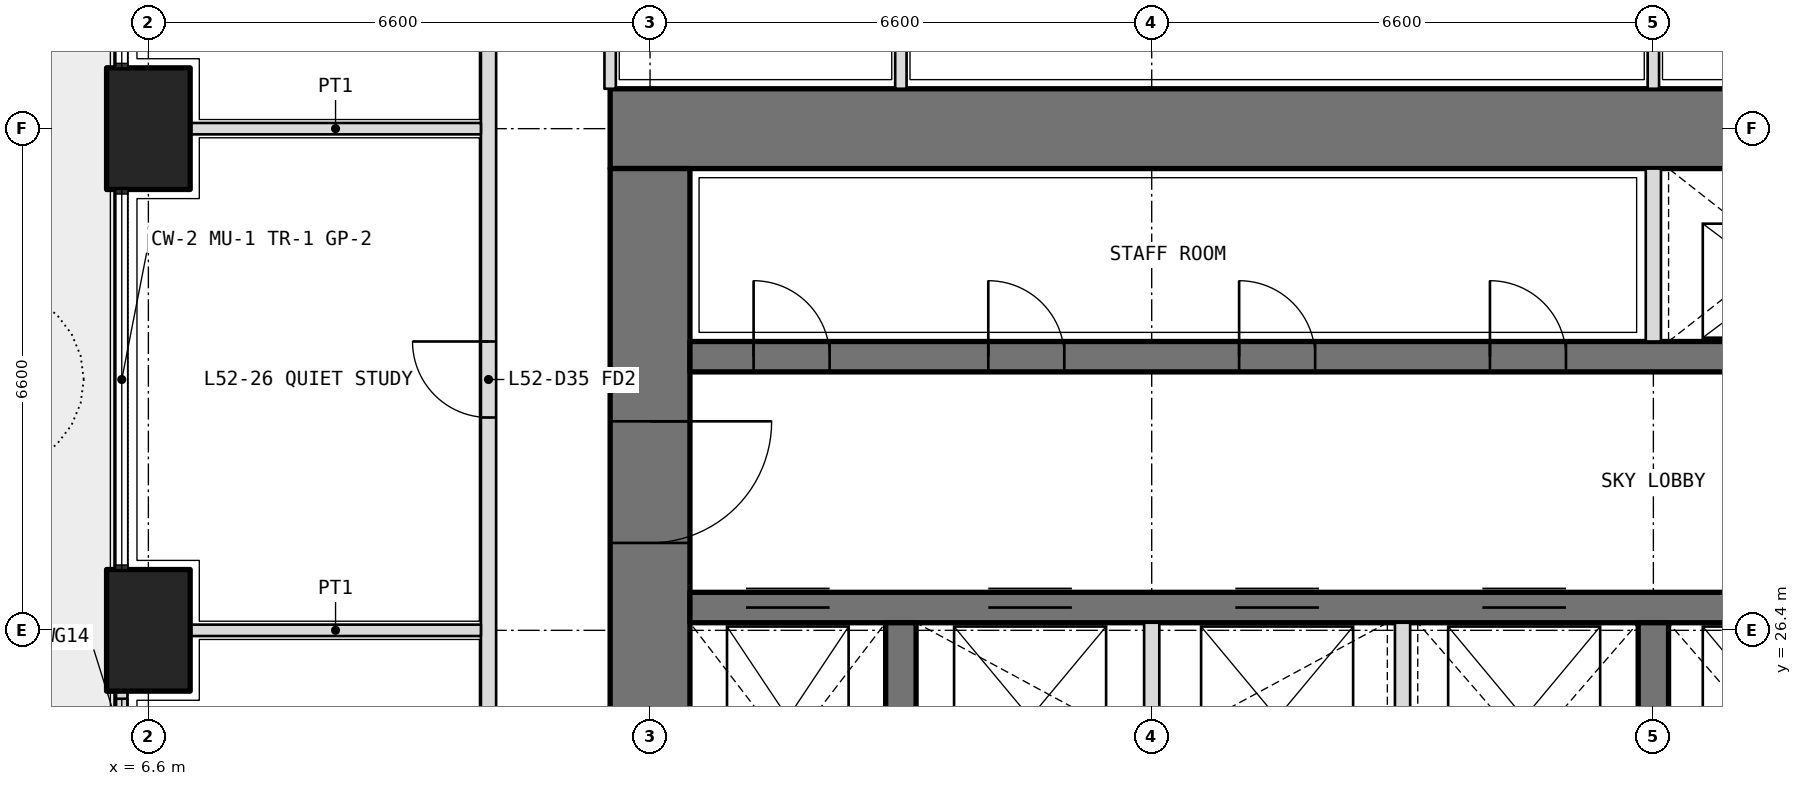
"""IFC4 building model, lengths in metres.
Left out: names, types, materials, properties, quantities, classifications, styles, units other than length and angle.
Written with IfcOpenShell. Run it as: python <this file> out.ifc"""

import sys

from ifc_helpers import new_model, si_unit, direction, frame, frame_2d, origin, origin_2d, place, context, subcontext, project, spatial, rectangle, extrude, element, fill, save


model = new_model("IFC4")
c1 = context("Model", 3, precision=1e-05, world=origin(), true_north=direction((0.0, 1.0)))
c2 = subcontext(c1, "Body", "Model", "MODEL_VIEW")
j1 = project(units=[si_unit("LENGTHUNIT", "METRE"), si_unit("PLANEANGLEUNIT", "RADIAN")], contexts=[c1])
p1 = place(None, origin())
s1 = spatial("IfcSite", under=j1, at=p1, CompositionType="ELEMENT")
p2 = place(p1, origin())
s2 = spatial("IfcBuilding", under=s1, at=p2, CompositionType="ELEMENT")
p3 = place(p2, frame((0.0, 0.0, 229.2)))
s3 = spatial("IfcBuildingStorey", under=s2, at=p3, CompositionType="ELEMENT", Elevation=229.2)
for number, where, z_axis, x_axis in (
    (1, (6.6, 26.4, 0.0), (0.0, 0.0, 1.0), (0.0, 1.0, 0.0)),
    (2, (6.6, 33.0, 0.0), (0.0, 0.0, 1.0), (0.0, 1.0, 0.0)),
):
    element("IfcColumn", number, at=place(p3, frame(where, z_axis=z_axis, x_axis=x_axis)), inside=s3, PredefinedType="COLUMN", context=c2, shape_type="SweptSolid", body=[
        extrude(rectangle(XDim=1.6, YDim=1.1, at=origin_2d()), origin(), (0.0, 0.0, 1.0), 4.2),
    ])
p4 = place(p3, frame((6.25, 25.6, 0.0), z_axis=(0.0, 0.0, 1.0), x_axis=(0.0, -1.0, 0.0)))
e3 = element("IfcWall", 3, at=p4, inside=s3, PredefinedType="SOLIDWALL", context=c2, shape_type="SweptSolid", body=[
    extrude(rectangle(XDim=5.0, YDim=0.15, at=frame_2d((2.5, 0.0))), origin(), (0.0, 0.0, 1.0), 2.7),
])
p5 = place(p4, frame((1.25, 0.0, 0.0)))
e4 = element("IfcOpeningElement", 4, at=p5, cuts=e3, PredefinedType="OPENING", context=c2, shape_type="SweptSolid", body=[
    extrude(rectangle(XDim=1.0, YDim=2.4, at=frame_2d((0.5, 1.2))), frame((0.0, 0.085, 0.0), z_axis=(0.0, -1.0, 0.0), x_axis=(1.0, 0.0, 0.0)), (0.0, 0.0, 1.0), 0.17),
])
p6 = place(p4, frame((0.1, 0.0, 0.1)))
e5 = element("IfcOpeningElement", 5, at=p6, cuts=e3, PredefinedType="OPENING", context=c2, shape_type="SweptSolid", body=[
    extrude(rectangle(XDim=1.05, YDim=2.3, at=frame_2d((0.525, 1.15))), frame((0.0, 0.085, 0.0), z_axis=(0.0, -1.0, 0.0), x_axis=(1.0, 0.0, 0.0)), (0.0, 0.0, 1.0), 0.17),
])
p7 = place(p4, frame((2.75, 0.0, 0.1)))
e6 = element("IfcOpeningElement", 6, at=p7, cuts=e3, PredefinedType="OPENING", context=c2, shape_type="SweptSolid", body=[
    extrude(rectangle(XDim=2.15, YDim=2.3, at=frame_2d((1.075, 1.15))), frame((0.0, 0.085, 0.0), z_axis=(0.0, -1.0, 0.0), x_axis=(1.0, 0.0, 0.0)), (0.0, 0.0, 1.0), 0.17),
])
p8 = place(p3, frame((40.125, 33.0, 0.0), z_axis=(0.0, 0.0, 1.0), x_axis=(-1.0, 0.0, 0.0)))
e7 = element("IfcWall", 7, at=p8, inside=s3, PredefinedType="SHEAR", context=c2, shape_type="SweptSolid", body=[
    extrude(rectangle(XDim=27.45, YDim=1.05, at=frame_2d((13.725, 0.0))), origin(), (0.0, 0.0, 1.0), 4.2),
])
p9 = place(p3, frame((13.2, 32.475, 0.0), z_axis=(0.0, 0.0, 1.0), x_axis=(0.0, -1.0, 0.0)))
e8 = element("IfcWall", 8, at=p9, inside=s3, PredefinedType="SHEAR", context=c2, shape_type="SweptSolid", body=[
    extrude(rectangle(XDim=18.75, YDim=1.05, at=frame_2d((9.375, 0.0))), origin(), (0.0, 0.0, 1.0), 4.2),
])
p10 = place(p9, frame((14.125, 0.0, 0.0)))
e9 = element("IfcOpeningElement", 9, at=p10, cuts=e8, PredefinedType="OPENING", context=c2, shape_type="SweptSolid", body=[
    extrude(rectangle(XDim=1.6, YDim=2.1, at=frame_2d((0.8, 1.05))), frame((0.0, 0.535, 0.0), z_axis=(0.0, -1.0, 0.0), x_axis=(1.0, 0.0, 0.0)), (0.0, 0.0, 1.0), 1.07),
])
p11 = place(p9, frame((3.325, 0.0, 0.0)))
e10 = element("IfcOpeningElement", 10, at=p11, cuts=e8, PredefinedType="OPENING", context=c2, shape_type="SweptSolid", body=[
    extrude(rectangle(XDim=1.6, YDim=2.1, at=frame_2d((0.8, 1.05))), frame((0.0, 0.535, 0.0), z_axis=(0.0, -1.0, 0.0), x_axis=(1.0, 0.0, 0.0)), (0.0, 0.0, 1.0), 1.07),
])
p12 = place(p3, frame((13.725, 26.7, 0.0), z_axis=(0.0, 0.0, 1.0), x_axis=(1.0, 0.0, 0.0)))
e11 = element("IfcWall", 11, at=p12, inside=s3, PredefinedType="SHEAR", context=c2, shape_type="SweptSolid", body=[
    extrude(rectangle(XDim=25.35, YDim=0.4, at=frame_2d((12.675, 0.0))), origin(), (0.0, 0.0, 1.0), 4.2),
])
p13 = place(p12, frame((23.95, 0.0, 0.0)))
e12 = element("IfcOpeningElement", 12, at=p13, cuts=e11, PredefinedType="OPENING", context=c2, shape_type="SweptSolid", body=[
    extrude(rectangle(XDim=1.2, YDim=2.1, at=frame_2d((0.6, 1.05))), frame((0.0, 0.21, 0.0), z_axis=(0.0, -1.0, 0.0), x_axis=(1.0, 0.0, 0.0)), (0.0, 0.0, 1.0), 0.42),
])
p14 = place(p12, frame((0.738, 0.0, 0.0)))
e13 = element("IfcOpeningElement", 13, at=p14, cuts=e11, PredefinedType="OPENING", context=c2, shape_type="SweptSolid", body=[
    extrude(rectangle(XDim=1.1, YDim=2.1, at=frame_2d((0.55, 1.05))), frame((0.0, 0.21, 0.0), z_axis=(0.0, -1.0, 0.0), x_axis=(1.0, 0.0, 0.0)), (0.0, 0.0, 1.0), 0.42),
])
p15 = place(p12, frame((3.925, 0.0, 0.0)))
e14 = element("IfcOpeningElement", 14, at=p15, cuts=e11, PredefinedType="OPENING", context=c2, shape_type="SweptSolid", body=[
    extrude(rectangle(XDim=1.1, YDim=2.1, at=frame_2d((0.55, 1.05))), frame((0.0, 0.21, 0.0), z_axis=(0.0, -1.0, 0.0), x_axis=(1.0, 0.0, 0.0)), (0.0, 0.0, 1.0), 0.42),
])
p16 = place(p12, frame((7.175, 0.0, 0.0)))
e15 = element("IfcOpeningElement", 15, at=p16, cuts=e11, PredefinedType="OPENING", context=c2, shape_type="SweptSolid", body=[
    extrude(rectangle(XDim=1.1, YDim=2.1, at=frame_2d((0.55, 1.05))), frame((0.0, 0.21, 0.0), z_axis=(0.0, -1.0, 0.0), x_axis=(1.0, 0.0, 0.0)), (0.0, 0.0, 1.0), 0.42),
])
p17 = place(p12, frame((10.425, 0.0, 0.0)))
e16 = element("IfcOpeningElement", 16, at=p17, cuts=e11, PredefinedType="OPENING", context=c2, shape_type="SweptSolid", body=[
    extrude(rectangle(XDim=1.1, YDim=2.1, at=frame_2d((0.55, 1.05))), frame((0.0, 0.21, 0.0), z_axis=(0.0, -1.0, 0.0), x_axis=(1.0, 0.0, 0.0)), (0.0, 0.0, 1.0), 0.42),
])
p18 = place(p12, frame((13.775, 0.0, 0.0)))
e17 = element("IfcOpeningElement", 17, at=p18, cuts=e11, PredefinedType="OPENING", context=c2, shape_type="SweptSolid", body=[
    extrude(rectangle(XDim=1.1, YDim=2.1, at=frame_2d((0.55, 1.05))), frame((0.0, 0.21, 0.0), z_axis=(0.0, -1.0, 0.0), x_axis=(1.0, 0.0, 0.0)), (0.0, 0.0, 1.0), 0.42),
])
p19 = place(p3, frame((13.725, 30.0, 0.0), z_axis=(0.0, 0.0, 1.0), x_axis=(1.0, 0.0, 0.0)))
e18 = element("IfcWall", 18, at=p19, inside=s3, PredefinedType="SHEAR", context=c2, shape_type="SweptSolid", body=[
    extrude(rectangle(XDim=25.35, YDim=0.4, at=frame_2d((12.675, 0.0))), origin(), (0.0, 0.0, 1.0), 4.2),
])
p20 = place(p19, frame((0.837, 0.0, 0.0)))
e19 = element("IfcOpeningElement", 19, at=p20, cuts=e18, PredefinedType="OPENING", context=c2, shape_type="SweptSolid", body=[
    extrude(rectangle(XDim=1.0, YDim=2.1, at=frame_2d((0.5, 1.05))), frame((0.0, 0.21, 0.0), z_axis=(0.0, -1.0, 0.0), x_axis=(1.0, 0.0, 0.0)), (0.0, 0.0, 1.0), 0.42),
])
p21 = place(p19, frame((3.925, 0.0, 0.0)))
e20 = element("IfcOpeningElement", 20, at=p21, cuts=e18, PredefinedType="OPENING", context=c2, shape_type="SweptSolid", body=[
    extrude(rectangle(XDim=1.0, YDim=2.1, at=frame_2d((0.5, 1.05))), frame((0.0, 0.21, 0.0), z_axis=(0.0, -1.0, 0.0), x_axis=(1.0, 0.0, 0.0)), (0.0, 0.0, 1.0), 0.42),
])
p22 = place(p19, frame((7.225, 0.0, 0.0)))
e21 = element("IfcOpeningElement", 21, at=p22, cuts=e18, PredefinedType="OPENING", context=c2, shape_type="SweptSolid", body=[
    extrude(rectangle(XDim=1.0, YDim=2.1, at=frame_2d((0.5, 1.05))), frame((0.0, 0.21, 0.0), z_axis=(0.0, -1.0, 0.0), x_axis=(1.0, 0.0, 0.0)), (0.0, 0.0, 1.0), 0.42),
])
p23 = place(p19, frame((10.525, 0.0, 0.0)))
e22 = element("IfcOpeningElement", 22, at=p23, cuts=e18, PredefinedType="OPENING", context=c2, shape_type="SweptSolid", body=[
    extrude(rectangle(XDim=1.0, YDim=2.1, at=frame_2d((0.5, 1.05))), frame((0.0, 0.21, 0.0), z_axis=(0.0, -1.0, 0.0), x_axis=(1.0, 0.0, 0.0)), (0.0, 0.0, 1.0), 0.42),
])
p24 = place(p19, frame((13.775, 0.0, 0.0)))
e23 = element("IfcOpeningElement", 23, at=p24, cuts=e18, PredefinedType="OPENING", context=c2, shape_type="SweptSolid", body=[
    extrude(rectangle(XDim=1.1, YDim=2.1, at=frame_2d((0.55, 1.05))), frame((0.0, 0.21, 0.0), z_axis=(0.0, -1.0, 0.0), x_axis=(1.0, 0.0, 0.0)), (0.0, 0.0, 1.0), 0.42),
])
p25 = place(p19, frame((17.075, 0.0, 0.0)))
e24 = element("IfcOpeningElement", 24, at=p25, cuts=e18, PredefinedType="OPENING", context=c2, shape_type="SweptSolid", body=[
    extrude(rectangle(XDim=1.1, YDim=2.1, at=frame_2d((0.55, 1.05))), frame((0.0, 0.21, 0.0), z_axis=(0.0, -1.0, 0.0), x_axis=(1.0, 0.0, 0.0)), (0.0, 0.0, 1.0), 0.42),
])
p26 = place(p19, frame((20.375, 0.0, 0.0)))
e25 = element("IfcOpeningElement", 25, at=p26, cuts=e18, PredefinedType="OPENING", context=c2, shape_type="SweptSolid", body=[
    extrude(rectangle(XDim=1.1, YDim=2.1, at=frame_2d((0.55, 1.05))), frame((0.0, 0.21, 0.0), z_axis=(0.0, -1.0, 0.0), x_axis=(1.0, 0.0, 0.0)), (0.0, 0.0, 1.0), 0.42),
])
p27 = place(p19, frame((23.462, 0.0, 0.0)))
e26 = element("IfcOpeningElement", 26, at=p27, cuts=e18, PredefinedType="OPENING", context=c2, shape_type="SweptSolid", body=[
    extrude(rectangle(XDim=1.1, YDim=2.1, at=frame_2d((0.55, 1.05))), frame((0.0, 0.21, 0.0), z_axis=(0.0, -1.0, 0.0), x_axis=(1.0, 0.0, 0.0)), (0.0, 0.0, 1.0), 0.42),
])
for number, where, z_axis, x_axis in (
    (27, (16.5, 23.15, 0.0), (0.0, 0.0, 1.0), (0.0, 1.0, 0.0)),
    (28, (26.4, 23.15, 0.0), (0.0, 0.0, 1.0), (0.0, 1.0, 0.0)),
):
    element("IfcWall", number, at=place(p3, frame(where, z_axis=z_axis, x_axis=x_axis)), inside=s3, PredefinedType="SHEAR", context=c2, shape_type="SweptSolid", body=[
        extrude(rectangle(XDim=3.35, YDim=0.4, at=frame_2d((1.675, 0.0))), origin(), (0.0, 0.0, 1.0), 4.2),
    ])
p28 = place(p3, frame((26.4, 30.2, 0.0), z_axis=(0.0, 0.0, 1.0), x_axis=(0.0, 1.0, 0.0)))
e29 = element("IfcWall", 29, at=p28, inside=s3, PredefinedType="PARTITIONING", context=c2, shape_type="SweptSolid", body=[
    extrude(rectangle(XDim=2.275, YDim=0.2, at=frame_2d((1.138, 0.0))), origin(), (0.0, 0.0, 1.0), 4.2),
])
for number, where, z_axis, x_axis in (
    (30, (19.8, 23.15, 0.0), (0.0, 0.0, 1.0), (0.0, 1.0, 0.0)),
    (31, (23.1, 23.15, 0.0), (0.0, 0.0, 1.0), (0.0, 1.0, 0.0)),
):
    element("IfcWall", number, at=place(p3, frame(where, z_axis=z_axis, x_axis=x_axis)), inside=s3, PredefinedType="PARTITIONING", context=c2, shape_type="SweptSolid", body=[
        extrude(rectangle(XDim=3.35, YDim=0.2, at=frame_2d((1.675, 0.0))), origin(), (0.0, 0.0, 1.0), 4.2),
    ])
p29 = place(p3, frame((12.675, 33.525, 0.0), z_axis=(0.0, 0.0, 1.0), x_axis=(0.0, 1.0, 0.0)))
e32 = element("IfcWall", 32, at=p29, inside=s3, PredefinedType="PARTITIONING", context=c2, shape_type="SweptSolid", body=[
    extrude(rectangle(XDim=3.675, YDim=0.15, at=frame_2d((1.837, 0.0))), origin(), (0.0, 0.0, 1.0), 3.0),
])
p30 = place(p3, frame((16.5, 33.525, 0.0), z_axis=(0.0, 0.0, 1.0), x_axis=(0.0, 1.0, 0.0)))
e33 = element("IfcWall", 33, at=p30, inside=s3, PredefinedType="PARTITIONING", context=c2, shape_type="SweptSolid", body=[
    extrude(rectangle(XDim=3.675, YDim=0.15, at=frame_2d((1.837, 0.0))), origin(), (0.0, 0.0, 1.0), 3.9),
])
p31 = place(p3, frame((26.4, 33.525, 0.0), z_axis=(0.0, 0.0, 1.0), x_axis=(0.0, 1.0, 0.0)))
e34 = element("IfcWall", 34, at=p31, inside=s3, PredefinedType="PARTITIONING", context=c2, shape_type="SweptSolid", body=[
    extrude(rectangle(XDim=3.675, YDim=0.15, at=frame_2d((1.837, 0.0))), origin(), (0.0, 0.0, 1.0), 3.0),
])
p32 = place(p3, frame((11.075, 7.4, 0.0), z_axis=(0.0, 0.0, 1.0), x_axis=(0.0, 1.0, 0.0)))
e35 = element("IfcWall", 35, at=p32, inside=s3, PredefinedType="PARTITIONING", context=c2, shape_type="SweptSolid", body=[
    extrude(rectangle(XDim=31.4, YDim=0.2, at=frame_2d((15.7, 0.0))), origin(), (0.0, 0.0, 1.0), 3.0),
])
p33 = place(p32, frame((2.35, 0.0, 0.0)))
e36 = element("IfcOpeningElement", 36, at=p33, cuts=e35, PredefinedType="OPENING", context=c2, shape_type="SweptSolid", body=[
    extrude(rectangle(XDim=1.0, YDim=2.1, at=frame_2d((0.5, 1.05))), frame((0.0, 0.11, 0.0), z_axis=(0.0, -1.0, 0.0), x_axis=(1.0, 0.0, 0.0)), (0.0, 0.0, 1.0), 0.22),
])
p34 = place(p32, frame((6.35, 0.0, 0.0)))
e37 = element("IfcOpeningElement", 37, at=p34, cuts=e35, PredefinedType="OPENING", context=c2, shape_type="SweptSolid", body=[
    extrude(rectangle(XDim=1.0, YDim=2.1, at=frame_2d((0.5, 1.05))), frame((0.0, 0.11, 0.0), z_axis=(0.0, -1.0, 0.0), x_axis=(1.0, 0.0, 0.0)), (0.0, 0.0, 1.0), 0.22),
])
p35 = place(p32, frame((9.45, 0.0, 0.0)))
e38 = element("IfcOpeningElement", 38, at=p35, cuts=e35, PredefinedType="OPENING", context=c2, shape_type="SweptSolid", body=[
    extrude(rectangle(XDim=0.9, YDim=2.1, at=frame_2d((0.45, 1.05))), frame((0.0, 0.11, 0.0), z_axis=(0.0, -1.0, 0.0), x_axis=(1.0, 0.0, 0.0)), (0.0, 0.0, 1.0), 0.22),
])
p36 = place(p32, frame((13.35, 0.0, 0.0)))
e39 = element("IfcOpeningElement", 39, at=p36, cuts=e35, PredefinedType="OPENING", context=c2, shape_type="SweptSolid", body=[
    extrude(rectangle(XDim=0.9, YDim=2.1, at=frame_2d((0.45, 1.05))), frame((0.0, 0.11, 0.0), z_axis=(0.0, -1.0, 0.0), x_axis=(1.0, 0.0, 0.0)), (0.0, 0.0, 1.0), 0.22),
])
p37 = place(p32, frame((16.85, 0.0, 0.0)))
e40 = element("IfcOpeningElement", 40, at=p37, cuts=e35, PredefinedType="OPENING", context=c2, shape_type="SweptSolid", body=[
    extrude(rectangle(XDim=1.0, YDim=2.1, at=frame_2d((0.5, 1.05))), frame((0.0, 0.11, 0.0), z_axis=(0.0, -1.0, 0.0), x_axis=(1.0, 0.0, 0.0)), (0.0, 0.0, 1.0), 0.22),
])
p38 = place(p32, frame((21.8, 0.0, 0.0)))
e41 = element("IfcOpeningElement", 41, at=p38, cuts=e35, PredefinedType="OPENING", context=c2, shape_type="SweptSolid", body=[
    extrude(rectangle(XDim=1.0, YDim=2.1, at=frame_2d((0.5, 1.05))), frame((0.0, 0.11, 0.0), z_axis=(0.0, -1.0, 0.0), x_axis=(1.0, 0.0, 0.0)), (0.0, 0.0, 1.0), 0.22),
])
p39 = place(p32, frame((28.05, 0.0, 0.0)))
e42 = element("IfcOpeningElement", 42, at=p39, cuts=e35, PredefinedType="OPENING", context=c2, shape_type="SweptSolid", body=[
    extrude(rectangle(XDim=1.0, YDim=2.1, at=frame_2d((0.5, 1.05))), frame((0.0, 0.11, 0.0), z_axis=(0.0, -1.0, 0.0), x_axis=(1.0, 0.0, 0.0)), (0.0, 0.0, 1.0), 0.22),
])
for number, where, z_axis, x_axis in (
    (43, (7.15, 26.4, 0.0), (0.0, 0.0, 1.0), (1.0, 0.0, 0.0)),
    (44, (7.15, 33.0, 0.0), (0.0, 0.0, 1.0), (1.0, 0.0, 0.0)),
):
    element("IfcWall", number, at=place(p3, frame(where, z_axis=z_axis, x_axis=x_axis)), inside=s3, PredefinedType="PARTITIONING", context=c2, shape_type="SweptSolid", body=[
        extrude(rectangle(XDim=3.825, YDim=0.15, at=frame_2d((1.913, 0.0))), origin(), (0.0, 0.0, 1.0), 3.0),
    ])
p40 = place(p6, origin())
e45 = element("IfcWindow", 45, at=p40, inside=s3, PartitioningType="SINGLE_PANEL", PredefinedType="WINDOW", context=c2, shape_type="SweptSolid", body=[
    extrude(rectangle(XDim=1.05, YDim=2.3, at=frame_2d((0.525, 1.15))), frame((0.0, 0.03, 0.0), z_axis=(0.0, -1.0, 0.0), x_axis=(1.0, 0.0, 0.0)), (0.0, 0.0, 1.0), 0.06),
])
fill(e5, e45)
p41 = place(p38, origin())
e46 = element("IfcDoor", 46, at=p41, inside=s3, OperationType="SINGLE_SWING_RIGHT", PredefinedType="DOOR", context=c2, shape_type="SweptSolid", body=[
    extrude(rectangle(XDim=1.0, YDim=2.1, at=frame_2d((0.5, 1.05))), frame((0.0, 0.025, 0.0), z_axis=(0.0, -1.0, 0.0), x_axis=(1.0, 0.0, 0.0)), (0.0, 0.0, 1.0), 0.05),
])
fill(e41, e46)
p42 = place(p20, origin())
e47 = element("IfcDoor", 47, at=p42, inside=s3, OperationType="SINGLE_SWING_LEFT", PredefinedType="DOOR", context=c2, shape_type="SweptSolid", body=[
    extrude(rectangle(XDim=1.0, YDim=2.1, at=frame_2d((0.5, 1.05))), frame((0.0, 0.025, 0.0), z_axis=(0.0, -1.0, 0.0), x_axis=(1.0, 0.0, 0.0)), (0.0, 0.0, 1.0), 0.05),
])
fill(e19, e47)
p43 = place(p21, origin())
e48 = element("IfcDoor", 48, at=p43, inside=s3, OperationType="SINGLE_SWING_LEFT", PredefinedType="DOOR", context=c2, shape_type="SweptSolid", body=[
    extrude(rectangle(XDim=1.0, YDim=2.1, at=frame_2d((0.5, 1.05))), frame((0.0, 0.025, 0.0), z_axis=(0.0, -1.0, 0.0), x_axis=(1.0, 0.0, 0.0)), (0.0, 0.0, 1.0), 0.05),
])
fill(e20, e48)
p44 = place(p22, origin())
e49 = element("IfcDoor", 49, at=p44, inside=s3, OperationType="SINGLE_SWING_LEFT", PredefinedType="DOOR", context=c2, shape_type="SweptSolid", body=[
    extrude(rectangle(XDim=1.0, YDim=2.1, at=frame_2d((0.5, 1.05))), frame((0.0, 0.025, 0.0), z_axis=(0.0, -1.0, 0.0), x_axis=(1.0, 0.0, 0.0)), (0.0, 0.0, 1.0), 0.05),
])
fill(e21, e49)
p45 = place(p23, origin())
e50 = element("IfcDoor", 50, at=p45, inside=s3, OperationType="SINGLE_SWING_LEFT", PredefinedType="DOOR", context=c2, shape_type="SweptSolid", body=[
    extrude(rectangle(XDim=1.0, YDim=2.1, at=frame_2d((0.5, 1.05))), frame((0.0, 0.025, 0.0), z_axis=(0.0, -1.0, 0.0), x_axis=(1.0, 0.0, 0.0)), (0.0, 0.0, 1.0), 0.05),
])
fill(e22, e50)
p46 = place(p11, origin())
e51 = element("IfcDoor", 51, at=p46, inside=s3, OperationType="DOUBLE_DOOR_DOUBLE_SWING", PredefinedType="DOOR", context=c2, shape_type="SweptSolid", body=[
    extrude(rectangle(XDim=1.6, YDim=2.1, at=frame_2d((0.8, 1.05))), frame((0.0, 0.025, 0.0), z_axis=(0.0, -1.0, 0.0), x_axis=(1.0, 0.0, 0.0)), (0.0, 0.0, 1.0), 0.05),
])
fill(e10, e51)
p47 = place(p14, origin())
e52 = element("IfcDoor", 52, at=p47, inside=s3, OperationType="DOUBLE_DOOR_SLIDING", PredefinedType="DOOR", context=c2, shape_type="SweptSolid", body=[
    extrude(rectangle(XDim=1.1, YDim=2.1, at=frame_2d((0.55, 1.05))), frame((0.0, 0.025, 0.0), z_axis=(0.0, -1.0, 0.0), x_axis=(1.0, 0.0, 0.0)), (0.0, 0.0, 1.0), 0.05),
])
fill(e13, e52)
p48 = place(p15, origin())
e53 = element("IfcDoor", 53, at=p48, inside=s3, OperationType="DOUBLE_DOOR_SLIDING", PredefinedType="DOOR", context=c2, shape_type="SweptSolid", body=[
    extrude(rectangle(XDim=1.1, YDim=2.1, at=frame_2d((0.55, 1.05))), frame((0.0, 0.025, 0.0), z_axis=(0.0, -1.0, 0.0), x_axis=(1.0, 0.0, 0.0)), (0.0, 0.0, 1.0), 0.05),
])
fill(e14, e53)
p49 = place(p16, origin())
e54 = element("IfcDoor", 54, at=p49, inside=s3, OperationType="DOUBLE_DOOR_SLIDING", PredefinedType="DOOR", context=c2, shape_type="SweptSolid", body=[
    extrude(rectangle(XDim=1.1, YDim=2.1, at=frame_2d((0.55, 1.05))), frame((0.0, 0.025, 0.0), z_axis=(0.0, -1.0, 0.0), x_axis=(1.0, 0.0, 0.0)), (0.0, 0.0, 1.0), 0.05),
])
fill(e15, e54)
p50 = place(p17, origin())
e55 = element("IfcDoor", 55, at=p50, inside=s3, OperationType="DOUBLE_DOOR_SLIDING", PredefinedType="DOOR", context=c2, shape_type="SweptSolid", body=[
    extrude(rectangle(XDim=1.1, YDim=2.1, at=frame_2d((0.55, 1.05))), frame((0.0, 0.025, 0.0), z_axis=(0.0, -1.0, 0.0), x_axis=(1.0, 0.0, 0.0)), (0.0, 0.0, 1.0), 0.05),
])
fill(e16, e55)
save(model, sys.argv[1])
